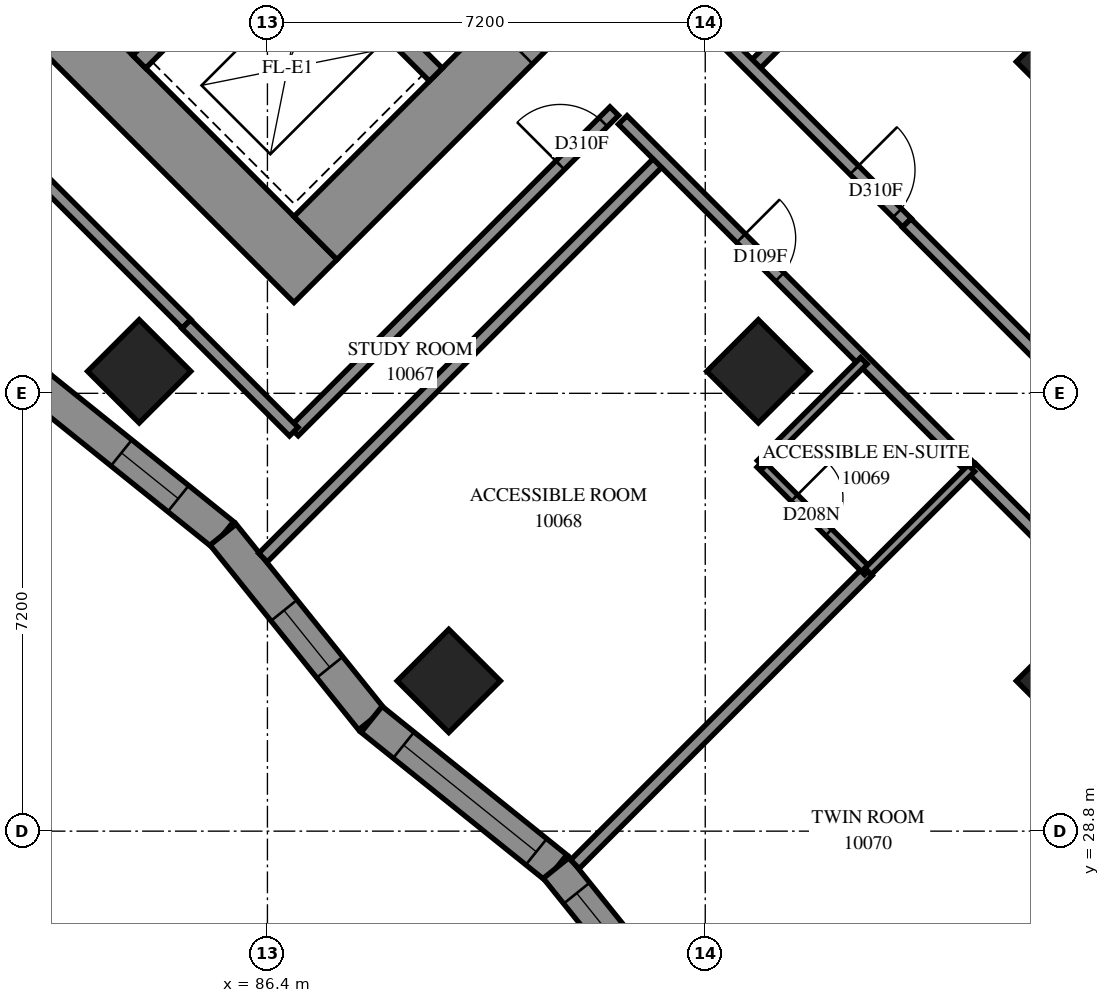
"""IFC4 building model, lengths in metres.
Left out: names, types, materials, properties, quantities, classifications, styles, units other than length and angle.
Written with IfcOpenShell. Run it as: python <this file> out.ifc"""

import sys

from ifc_helpers import new_model, si_unit, direction, frame, frame_2d, origin, origin_2d, place, context, subcontext, project, spatial, polyline, rectangle, outline, extrude, element, fill, save


model = new_model("IFC4")
c1 = context("Model", 3, precision=1e-05, world=origin(), true_north=direction((0.0, 1.0)))
c2 = subcontext(c1, "Body", "Model", "MODEL_VIEW")
j1 = project(units=[si_unit("LENGTHUNIT", "METRE"), si_unit("PLANEANGLEUNIT", "RADIAN")], contexts=[c1])
p1 = place(None, origin())
s1 = spatial("IfcSite", under=j1, at=p1, CompositionType="ELEMENT")
p2 = place(p1, origin())
s2 = spatial("IfcBuilding", under=s1, at=p2, CompositionType="ELEMENT")
p3 = place(p2, frame((0.0, 0.0, 40.6)))
s3 = spatial("IfcBuildingStorey", under=s2, at=p3, CompositionType="ELEMENT", Elevation=40.6)
for number, where, z_axis, x_axis in (
    (1, (84.291, 36.362, 0.0), (0.0, 0.0, 1.0), (0.707, -0.707, 0.0)),
    (2, (99.565, 41.453, 0.0), (0.0, 0.0, 1.0), (0.707, -0.707, 0.0)),
    (3, (94.474, 36.362, 0.0), (0.0, 0.0, 1.0), (0.707, -0.707, 0.0)),
    (4, (89.382, 31.271, 0.0), (0.0, 0.0, 1.0), (0.707, -0.707, 0.0)),
    (5, (99.565, 31.271, 0.0), (0.0, 0.0, 1.0), (0.707, -0.707, 0.0)),
):
    element("IfcColumn", number, at=place(p3, frame(where, z_axis=z_axis, x_axis=x_axis)), inside=s3, PredefinedType="COLUMN", context=c2, shape_type="SweptSolid", body=[
        extrude(rectangle(XDim=1.2, YDim=1.2, at=origin_2d()), origin(), (0.0, 0.0, 1.0), 3.1),
    ])
p4 = place(p3, frame((75.594, 49.443, -0.3), z_axis=(0.0, 0.0, 1.0), x_axis=(0.7071037324, -0.70710983, 0.0)))
e6 = element("IfcWall", 6, at=p4, inside=s3, PredefinedType="SHEAR", context=c2, shape_type="SweptSolid", body=[
    extrude(rectangle(XDim=16.4, YDim=1.0, at=frame_2d((8.2, 0.0))), origin(), (0.0, 0.0, 1.0), 2.7),
])
p5 = place(p3, frame((87.19, 38.554, -0.3), z_axis=(0.0, 0.0, 1.0), x_axis=(0.707103309, 0.7071102534, 0.0)))
e7 = element("IfcWall", 7, at=p5, inside=s3, PredefinedType="SHEAR", context=c2, shape_type="SweptSolid", body=[
    extrude(rectangle(XDim=14.4, YDim=1.0, at=frame_2d((7.2, 0.0))), origin(), (0.0, 0.0, 1.0), 2.7),
])
p6 = place(p5, frame((4.55, 0.0, 0.3)))
e8 = element("IfcOpeningElement", 8, at=p6, cuts=e7, PredefinedType="OPENING", context=c2, shape_type="SweptSolid", body=[
    extrude(rectangle(XDim=1.1, YDim=2.1, at=frame_2d((0.55, 1.05))), frame((0.0, 0.51, 0.0), z_axis=(0.0, -1.0, 0.0), x_axis=(1.0, 0.0, 0.0)), (0.0, 0.0, 1.0), 1.02),
])
p7 = place(p5, frame((11.35, 0.0, 0.3)))
e9 = element("IfcOpeningElement", 9, at=p7, cuts=e7, PredefinedType="OPENING", context=c2, shape_type="SweptSolid", body=[
    extrude(rectangle(XDim=1.1, YDim=2.1, at=frame_2d((0.55, 1.05))), frame((0.0, 0.51, 0.0), z_axis=(0.0, -1.0, 0.0), x_axis=(1.0, 0.0, 0.0)), (0.0, 0.0, 1.0), 1.02),
])
p8 = place(p3, frame((84.291, 41.453, 0.0), z_axis=(0.0, 0.0, 1.0), x_axis=(0.7071067812, 0.7071067812, 0.0)))
e10 = element("IfcWall", 10, at=p8, inside=s3, PredefinedType="SOLIDWALL", context=c2, shape_type="SweptSolid", body=[
    extrude(rectangle(XDim=3.3, YDim=0.3, at=frame_2d((1.65, 0.0))), origin(), (0.0, 0.0, 1.0), 3.1),
])
p9 = place(p3, frame((78.988, 51.423, 0.0), z_axis=(0.0, 0.0, 1.0), x_axis=(0.7071067812, -0.7071067812, 0.0)))
e11 = element("IfcWall", 11, at=p9, inside=s3, PredefinedType="SOLIDWALL", context=c2, shape_type="SweptSolid", body=[
    extrude(rectangle(XDim=14.4, YDim=0.3, at=frame_2d((7.2, 0.0))), origin(), (0.0, 0.0, 1.0), 3.1),
])
p10 = place(p9, frame((1.25, 0.0, 0.0)))
e12 = element("IfcOpeningElement", 12, at=p10, cuts=e11, PredefinedType="OPENING", context=c2, shape_type="SweptSolid", body=[
    extrude(rectangle(XDim=1.1, YDim=2.1, at=frame_2d((0.55, 1.05))), frame((0.0, 0.16, 0.0), z_axis=(0.0, -1.0, 0.0), x_axis=(1.0, 0.0, 0.0)), (0.0, 0.0, 1.0), 0.32),
])
p11 = place(p9, frame((4.85, 0.0, 0.0)))
e13 = element("IfcOpeningElement", 13, at=p11, cuts=e11, PredefinedType="OPENING", context=c2, shape_type="SweptSolid", body=[
    extrude(rectangle(XDim=1.1, YDim=2.1, at=frame_2d((0.55, 1.05))), frame((0.0, 0.16, 0.0), z_axis=(0.0, -1.0, 0.0), x_axis=(1.0, 0.0, 0.0)), (0.0, 0.0, 1.0), 0.32),
])
p12 = place(p9, frame((8.45, 0.0, 0.0)))
e14 = element("IfcOpeningElement", 14, at=p12, cuts=e11, PredefinedType="OPENING", context=c2, shape_type="SweptSolid", body=[
    extrude(rectangle(XDim=1.1, YDim=2.1, at=frame_2d((0.55, 1.05))), frame((0.0, 0.16, 0.0), z_axis=(0.0, -1.0, 0.0), x_axis=(1.0, 0.0, 0.0)), (0.0, 0.0, 1.0), 0.32),
])
p13 = place(p9, frame((12.05, 0.0, 0.0)))
e15 = element("IfcOpeningElement", 15, at=p13, cuts=e11, PredefinedType="OPENING", context=c2, shape_type="SweptSolid", body=[
    extrude(rectangle(XDim=1.1, YDim=2.1, at=frame_2d((0.55, 1.05))), frame((0.0, 0.16, 0.0), z_axis=(0.0, -1.0, 0.0), x_axis=(1.0, 0.0, 0.0)), (0.0, 0.0, 1.0), 0.32),
])
p14 = place(p3, frame((82.633, 36.119, 0.0), z_axis=(0.0, 0.0, 1.0), x_axis=(0.7793447186, -0.6265954114, 0.0)))
e16 = element("IfcWall", 16, at=p14, inside=s3, PredefinedType="SOLIDWALL", context=c2, shape_type="SweptSolid", body=[
    extrude(outline(polyline([(-0.03, -0.275), (3.868, -0.275), (3.928, 0.275), (0.03, 0.275), (-0.03, -0.275)])), origin(), (0.0, 0.0, 1.0), 3.1),
])
p15 = place(p14, frame((1.752, 0.0, 0.5)))
e17 = element("IfcOpeningElement", 17, at=p15, cuts=e16, PredefinedType="OPENING", context=c2, shape_type="SweptSolid", body=[
    extrude(rectangle(XDim=1.2, YDim=2.45, at=frame_2d((0.6, 1.225))), frame((0.0, 0.285, 0.0), z_axis=(0.0, -1.0, 0.0), x_axis=(1.0, 0.0, 0.0)), (0.0, 0.0, 1.0), 0.57),
])
p16 = place(p3, frame((85.671, 33.676, 0.0), z_axis=(0.0, 0.0, 1.0), x_axis=(0.6265954114, -0.7793447186, 0.0)))
e18 = element("IfcWall", 18, at=p16, inside=s3, PredefinedType="SOLIDWALL", context=c2, shape_type="SweptSolid", body=[
    extrude(outline(polyline([(0.03, -0.275), (3.928, -0.275), (3.868, 0.275), (-0.03, 0.275), (0.03, -0.275)])), origin(), (0.0, 0.0, 1.0), 3.1),
])
p17 = place(p16, frame((1.599, 0.0, 0.5)))
e19 = element("IfcOpeningElement", 19, at=p17, cuts=e18, PredefinedType="OPENING", context=c2, shape_type="SweptSolid", body=[
    extrude(rectangle(XDim=1.2, YDim=2.45, at=frame_2d((0.6, 1.225))), frame((0.0, 0.285, 0.0), z_axis=(0.0, -1.0, 0.0), x_axis=(1.0, 0.0, 0.0)), (0.0, 0.0, 1.0), 0.57),
])
p18 = place(p3, frame((88.113, 30.639, 0.0), z_axis=(0.0, 0.0, 1.0), x_axis=(0.7793447186, -0.6265954114, 0.0)))
e20 = element("IfcWall", 20, at=p18, inside=s3, PredefinedType="SOLIDWALL", context=c2, shape_type="SweptSolid", body=[
    extrude(outline(polyline([(-0.03, -0.275), (3.868, -0.275), (3.928, 0.275), (0.03, 0.275), (-0.03, -0.275)])), origin(), (0.0, 0.0, 1.0), 3.1),
])
p19 = place(p18, frame((0.675, 0.0, 0.5)))
e21 = element("IfcOpeningElement", 21, at=p19, cuts=e20, PredefinedType="OPENING", context=c2, shape_type="SweptSolid", body=[
    extrude(rectangle(XDim=2.8, YDim=2.45, at=frame_2d((1.4, 1.225))), frame((0.0, 0.285, 0.0), z_axis=(0.0, -1.0, 0.0), x_axis=(1.0, 0.0, 0.0)), (0.0, 0.0, 1.0), 0.57),
])
p20 = place(p3, frame((91.151, 28.196, 0.0), z_axis=(0.0, 0.0, 1.0), x_axis=(0.6266079397, -0.7793346456, 0.0)))
e22 = element("IfcWall", 22, at=p20, inside=s3, PredefinedType="SOLIDWALL", context=c2, shape_type="SweptSolid", body=[
    extrude(outline(polyline([(0.03, -0.275), (3.928, -0.275), (3.868, 0.275), (-0.03, 0.275), (0.03, -0.275)])), origin(), (0.0, 0.0, 1.0), 3.1),
])
p21 = place(p20, frame((0.534, 0.0, 0.5)))
e23 = element("IfcOpeningElement", 23, at=p21, cuts=e22, PredefinedType="OPENING", context=c2, shape_type="SweptSolid", body=[
    extrude(rectangle(XDim=2.8, YDim=2.45, at=frame_2d((1.4, 1.225))), frame((0.0, 0.285, 0.0), z_axis=(0.0, -1.0, 0.0), x_axis=(1.0, 0.0, 0.0)), (0.0, 0.0, 1.0), 0.57),
])
p22 = place(p3, frame((94.367, 41.349, 0.0), z_axis=(0.0, 0.0, 1.0), x_axis=(0.7071109856, 0.7071025768, 0.0)))
e24 = element("IfcWall", 24, at=p22, inside=s3, PredefinedType="PARTITIONING", context=c2, shape_type="SweptSolid", body=[
    extrude(rectangle(XDim=11.892, YDim=0.2, at=frame_2d((5.946, 0.0))), origin(), (0.0, 0.0, 1.0), 3.1),
])
p23 = place(p3, frame((86.327, 33.299, 0.0), z_axis=(0.0, 0.0, 1.0), x_axis=(0.7069989659, 0.7072145801, 0.0)))
e25 = element("IfcWall", 25, at=p23, inside=s3, PredefinedType="PARTITIONING", context=c2, shape_type="SweptSolid", body=[
    extrude(rectangle(XDim=9.276, YDim=0.2, at=frame_2d((4.638, 0.0))), origin(), (0.0, 0.0, 1.0), 3.1),
])
p24 = place(p3, frame((92.243, 40.495, 0.0), z_axis=(0.0, 0.0, 1.0), x_axis=(0.7071067812, -0.7071067812, 0.0)))
e26 = element("IfcWall", 26, at=p24, inside=s3, PredefinedType="PARTITIONING", context=c2, shape_type="SweptSolid", body=[
    extrude(rectangle(XDim=8.101, YDim=0.2, at=frame_2d((4.05, 0.0))), origin(), (0.0, 0.0, 1.0), 3.1),
])
p25 = place(p24, frame((2.75, 0.0, 0.0)))
e27 = element("IfcOpeningElement", 27, at=p25, cuts=e26, PredefinedType="OPENING", context=c2, shape_type="SweptSolid", body=[
    extrude(rectangle(XDim=0.9, YDim=2.1, at=frame_2d((0.45, 1.05))), frame((0.0, 0.11, 0.0), z_axis=(0.0, -1.0, 0.0), x_axis=(1.0, 0.0, 0.0)), (0.0, 0.0, 1.0), 0.22),
])
p26 = place(p3, frame((86.836, 35.372, 0.0), z_axis=(0.0, 0.0, 1.0), x_axis=(0.7071067812, 0.7071067812, 0.0)))
e28 = element("IfcWall", 28, at=p26, inside=s3, PredefinedType="PARTITIONING", context=c2, shape_type="SweptSolid", body=[
    extrude(rectangle(XDim=7.45, YDim=0.2, at=frame_2d((3.725, 0.0))), origin(), (0.0, 0.0, 1.0), 3.1),
])
p27 = place(p26, frame((6.192, 0.0, 0.0)))
e29 = element("IfcOpeningElement", 29, at=p27, cuts=e28, PredefinedType="OPENING", context=c2, shape_type="SweptSolid", body=[
    extrude(rectangle(XDim=1.0, YDim=2.1, at=frame_2d((0.5, 1.05))), frame((0.0, 0.11, 0.0), z_axis=(0.0, -1.0, 0.0), x_axis=(1.0, 0.0, 0.0)), (0.0, 0.0, 1.0), 0.22),
])
p28 = place(p3, frame((96.532, 23.148, 0.0), z_axis=(0.0, 0.0, 1.0), x_axis=(0.7071140939, 0.7070994684, 0.0)))
e30 = element("IfcWall", 30, at=p28, inside=s3, PredefinedType="PARTITIONING", context=c2, shape_type="SweptSolid", body=[
    extrude(rectangle(XDim=6.837, YDim=0.2, at=frame_2d((3.419, 0.0))), origin(), (0.0, 0.0, 1.0), 3.1),
])
p29 = place(p3, frame((91.456, 28.255, 0.0), z_axis=(0.0, 0.0, 1.0), x_axis=(0.7071067812, 0.7071067812, 0.0)))
e31 = element("IfcWall", 31, at=p29, inside=s3, PredefinedType="PARTITIONING", context=c2, shape_type="SweptSolid", body=[
    extrude(rectangle(XDim=6.815, YDim=0.2, at=frame_2d((3.408, 0.0))), origin(), (0.0, 0.0, 1.0), 3.1),
])
p30 = place(p3, frame((85.07, 37.142, 0.0), z_axis=(0.0, 0.0, 1.0), x_axis=(-0.7070899851, 0.7071235769, 0.0)))
e32 = element("IfcWall", 32, at=p30, inside=s3, PredefinedType="PARTITIONING", context=c2, shape_type="SweptSolid", body=[
    extrude(rectangle(XDim=5.954, YDim=0.2, at=frame_2d((2.977, 0.0))), origin(), (0.0, 0.0, 1.0), 3.1),
])
p31 = place(p3, frame((93.735, 41.987, 0.0), z_axis=(0.0, 0.0, 1.0), x_axis=(0.7071067812, -0.7071067812, 0.0)))
e33 = element("IfcWall", 33, at=p31, inside=s3, PredefinedType="PARTITIONING", context=c2, shape_type="SweptSolid", body=[
    extrude(rectangle(XDim=4.5, YDim=0.2, at=frame_2d((2.25, 0.0))), origin(), (0.0, 0.0, 1.0), 3.1),
])
p32 = place(p31, frame((3.274, 0.0, 0.0)))
e34 = element("IfcOpeningElement", 34, at=p32, cuts=e33, PredefinedType="OPENING", context=c2, shape_type="SweptSolid", body=[
    extrude(rectangle(XDim=1.0, YDim=2.1, at=frame_2d((0.5, 1.05))), frame((0.0, 0.11, 0.0), z_axis=(0.0, -1.0, 0.0), x_axis=(1.0, 0.0, 0.0)), (0.0, 0.0, 1.0), 0.22),
])
p33 = place(p3, frame((96.913, 38.801, 0.0), z_axis=(0.0, 0.0, 1.0), x_axis=(0.7068288851, -0.7073845681, 0.0)))
e35 = element("IfcWall", 35, at=p33, inside=s3, PredefinedType="PARTITIONING", context=c2, shape_type="SweptSolid", body=[
    extrude(rectangle(XDim=3.599, YDim=0.2, at=frame_2d((1.8, 0.0))), origin(), (0.0, 0.0, 1.0), 3.1),
])
p34 = place(p3, frame((97.976, 34.772, 0.0), z_axis=(0.0, 0.0, 1.0), x_axis=(0.7073845681, -0.7068288851, 0.0)))
e36 = element("IfcWall", 36, at=p34, inside=s3, PredefinedType="PARTITIONING", context=c2, shape_type="SweptSolid", body=[
    extrude(rectangle(XDim=3.599, YDim=0.2, at=frame_2d((1.8, 0.0))), origin(), (0.0, 0.0, 1.0), 3.1),
])
p35 = place(p34, frame((1.858, 0.0, 0.0)))
e37 = element("IfcOpeningElement", 37, at=p35, cuts=e36, PredefinedType="OPENING", context=c2, shape_type="SweptSolid", body=[
    extrude(rectangle(XDim=0.9, YDim=2.1, at=frame_2d((0.45, 1.05))), frame((0.0, 0.11, 0.0), z_axis=(0.0, -1.0, 0.0), x_axis=(1.0, 0.0, 0.0)), (0.0, 0.0, 1.0), 0.22),
])
p36 = place(p3, frame((85.065, 37.137, 0.0), z_axis=(0.0, 0.0, 1.0), x_axis=(0.7071067812, -0.7071067812, 0.0)))
e38 = element("IfcWall", 38, at=p36, inside=s3, PredefinedType="PARTITIONING", context=c2, shape_type="SweptSolid", body=[
    extrude(rectangle(XDim=2.5, YDim=0.2, at=frame_2d((1.25, 0.0))), origin(), (0.0, 0.0, 1.0), 3.1),
])
p37 = place(p3, frame((94.505, 34.839, 0.0), z_axis=(0.0, 0.0, 1.0), x_axis=(0.7071067812, -0.7071067812, 0.0)))
e39 = element("IfcWall", 39, at=p37, inside=s3, PredefinedType="PARTITIONING", context=c2, shape_type="SweptSolid", body=[
    extrude(rectangle(XDim=2.5, YDim=0.15, at=frame_2d((1.25, 0.0))), origin(), (0.0, 0.0, 1.0), 3.1),
])
p38 = place(p37, frame((0.792, 0.0, 0.0)))
e40 = element("IfcOpeningElement", 40, at=p38, cuts=e39, PredefinedType="OPENING", context=c2, shape_type="SweptSolid", body=[
    extrude(rectangle(XDim=0.8, YDim=2.1, at=frame_2d((0.4, 1.05))), frame((0.0, 0.085, 0.0), z_axis=(0.0, -1.0, 0.0), x_axis=(1.0, 0.0, 0.0)), (0.0, 0.0, 1.0), 0.17),
])
for number, where, z_axis, x_axis in (
    (41, (96.278, 33.072, 0.0), (0.0, 0.0, 1.0), (0.708, 0.707, 0.0)),
    (42, (94.511, 34.839, 0.0), (0.0, 0.0, 1.0), (0.708, 0.707, 0.0)),
):
    element("IfcWall", number, at=place(p3, frame(where, z_axis=z_axis, x_axis=x_axis)), inside=s3, PredefinedType="PARTITIONING", context=c2, shape_type="SweptSolid", body=[
        extrude(rectangle(XDim=2.4, YDim=0.15, at=frame_2d((1.2, 0.0))), origin(), (0.0, 0.0, 1.0), 3.1),
    ])
p39 = place(p15, origin())
e43 = element("IfcWindow", 43, at=p39, inside=s3, PartitioningType="SINGLE_PANEL", PredefinedType="WINDOW", context=c2, shape_type="SweptSolid", body=[
    extrude(rectangle(XDim=1.2, YDim=2.45, at=frame_2d((0.6, 1.225))), frame((0.0, 0.155, 0.0), z_axis=(0.0, -1.0, 0.0), x_axis=(1.0, 0.0, 0.0)), (0.0, 0.0, 1.0), 0.06),
])
fill(e17, e43)
p40 = place(p17, origin())
e44 = element("IfcWindow", 44, at=p40, inside=s3, PartitioningType="SINGLE_PANEL", PredefinedType="WINDOW", context=c2, shape_type="SweptSolid", body=[
    extrude(rectangle(XDim=1.2, YDim=2.45, at=frame_2d((0.6, 1.225))), frame((0.0, 0.155, 0.0), z_axis=(0.0, -1.0, 0.0), x_axis=(1.0, 0.0, 0.0)), (0.0, 0.0, 1.0), 0.06),
])
fill(e19, e44)
p41 = place(p19, origin())
e45 = element("IfcWindow", 45, at=p41, inside=s3, PartitioningType="SINGLE_PANEL", PredefinedType="WINDOW", context=c2, shape_type="SweptSolid", body=[
    extrude(rectangle(XDim=2.8, YDim=2.45, at=frame_2d((1.4, 1.225))), frame((0.0, 0.155, 0.0), z_axis=(0.0, -1.0, 0.0), x_axis=(1.0, 0.0, 0.0)), (0.0, 0.0, 1.0), 0.06),
])
fill(e21, e45)
p42 = place(p21, origin())
e46 = element("IfcWindow", 46, at=p42, inside=s3, PartitioningType="SINGLE_PANEL", PredefinedType="WINDOW", context=c2, shape_type="SweptSolid", body=[
    extrude(rectangle(XDim=2.8, YDim=2.45, at=frame_2d((1.4, 1.225))), frame((0.0, 0.155, 0.0), z_axis=(0.0, -1.0, 0.0), x_axis=(1.0, 0.0, 0.0)), (0.0, 0.0, 1.0), 0.06),
])
fill(e23, e46)
p43 = place(p32, origin())
e47 = element("IfcDoor", 47, at=p43, inside=s3, OperationType="SINGLE_SWING_RIGHT", PredefinedType="DOOR", context=c2, shape_type="SweptSolid", body=[
    extrude(rectangle(XDim=1.0, YDim=2.1, at=frame_2d((0.5, 1.05))), frame((0.0, 0.025, 0.0), z_axis=(0.0, -1.0, 0.0), x_axis=(1.0, 0.0, 0.0)), (0.0, 0.0, 1.0), 0.05),
])
fill(e34, e47)
p44 = place(p27, origin())
e48 = element("IfcDoor", 48, at=p44, inside=s3, OperationType="SINGLE_SWING_RIGHT", PredefinedType="DOOR", context=c2, shape_type="SweptSolid", body=[
    extrude(rectangle(XDim=1.0, YDim=2.1, at=frame_2d((0.5, 1.05))), frame((0.0, 0.025, 0.0), z_axis=(0.0, -1.0, 0.0), x_axis=(1.0, 0.0, 0.0)), (0.0, 0.0, 1.0), 0.05),
])
fill(e29, e48)
p45 = place(p25, origin())
e49 = element("IfcDoor", 49, at=p45, inside=s3, OperationType="SINGLE_SWING_LEFT", PredefinedType="DOOR", context=c2, shape_type="SweptSolid", body=[
    extrude(rectangle(XDim=0.9, YDim=2.1, at=frame_2d((0.45, 1.05))), frame((0.0, 0.025, 0.0), z_axis=(0.0, -1.0, 0.0), x_axis=(1.0, 0.0, 0.0)), (0.0, 0.0, 1.0), 0.05),
])
fill(e27, e49)
p46 = place(p38, origin())
e50 = element("IfcDoor", 50, at=p46, inside=s3, OperationType="SINGLE_SWING_RIGHT", PredefinedType="DOOR", context=c2, shape_type="SweptSolid", body=[
    extrude(rectangle(XDim=0.8, YDim=2.1, at=frame_2d((0.4, 1.05))), frame((0.0, 0.025, 0.0), z_axis=(0.0, -1.0, 0.0), x_axis=(1.0, 0.0, 0.0)), (0.0, 0.0, 1.0), 0.05),
])
fill(e40, e50)
save(model, sys.argv[1])
